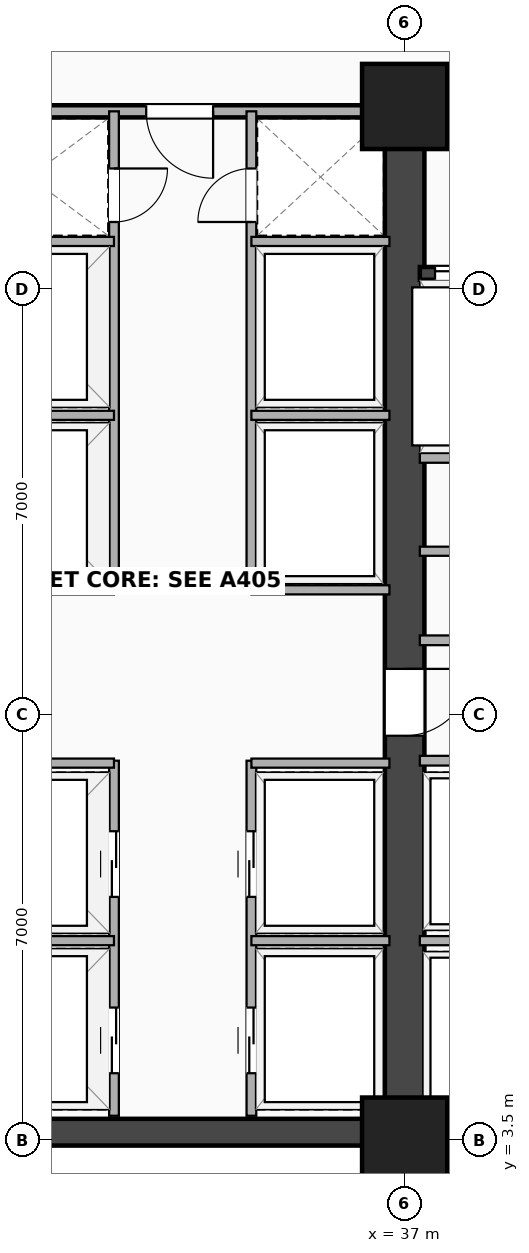
"""IFC4 building model, lengths in metres.
Left out: names, types, materials, properties, quantities, classifications, styles, units other than length and angle.
Written with IfcOpenShell. Run it as: python <this file> out.ifc"""

import sys

from ifc_helpers import new_model, si_unit, direction, frame, frame_2d, origin, origin_2d, place, context, subcontext, project, spatial, rectangle, extrude, element, fill, save


model = new_model("IFC4")
c1 = context("Model", 3, precision=1e-05, world=origin(), true_north=direction((0.0, 1.0)))
c2 = subcontext(c1, "Body", "Model", "MODEL_VIEW")
j1 = project(units=[si_unit("LENGTHUNIT", "METRE"), si_unit("PLANEANGLEUNIT", "RADIAN")], contexts=[c1])
p1 = place(None, origin())
s1 = spatial("IfcSite", under=j1, at=p1, CompositionType="ELEMENT")
p2 = place(p1, origin())
s2 = spatial("IfcBuilding", under=s1, at=p2, CompositionType="ELEMENT")
p3 = place(p2, frame((0.0, 0.0, 71.9)))
s3 = spatial("IfcBuildingStorey", under=s2, at=p3, CompositionType="ELEMENT", Elevation=71.9)
p4 = place(p3, frame((20.3, 3.63, 0.0), z_axis=(0.0, 0.0, 1.0), x_axis=(1.0, 0.0, 0.0)))
e1 = element("IfcWall", 1, at=p4, inside=s3, PredefinedType="SHEAR", context=c2, shape_type="SweptSolid", body=[
    extrude(rectangle(XDim=24.5, YDim=0.44, at=frame_2d((12.25, 0.0))), origin(), (0.0, 0.0, 1.0), 3.18),
])
p5 = place(p3, frame((37.0, 3.5, 0.0), z_axis=(0.0, 0.0, 1.0), x_axis=(0.0, 1.0, 0.0)))
e2 = element("IfcWall", 2, at=p5, inside=s3, PredefinedType="SHEAR", context=c2, shape_type="SweptSolid", body=[
    extrude(rectangle(XDim=16.9, YDim=0.65, at=frame_2d((8.45, 0.0))), origin(), (0.0, 0.0, 1.0), 3.18),
])
p6 = place(p5, frame((6.65, 0.0, 0.0)))
e3 = element("IfcOpeningElement", 3, at=p6, cuts=e2, PredefinedType="OPENING", context=c2, shape_type="SweptSolid", body=[
    extrude(rectangle(XDim=1.1, YDim=2.15, at=frame_2d((0.55, 1.075))), frame((0.0, 0.335, 0.0), z_axis=(0.0, -1.0, 0.0), x_axis=(1.0, 0.0, 0.0)), (0.0, 0.0, 1.0), 0.67),
])
p7 = place(p3, frame((37.25, 17.755, 0.0), z_axis=(0.0, 0.0, 1.0), x_axis=(1.0, 0.0, 0.0)))
e4 = element("IfcWall", 4, at=p7, inside=s3, PredefinedType="SHEAR", context=c2, shape_type="SweptSolid", body=[
    extrude(rectangle(XDim=7.2, YDim=0.21, at=frame_2d((3.6, 0.0))), origin(), (0.0, 0.0, 1.0), 3.18),
])
p8 = place(p7, frame((0.25, 0.0, 0.0)))
e5 = element("IfcOpeningElement", 5, at=p8, cuts=e4, PredefinedType="OPENING", context=c2, shape_type="SweptSolid", body=[
    extrude(rectangle(XDim=1.12, YDim=2.2, at=frame_2d((0.56, 1.1))), frame((0.0, 0.115, 0.0), z_axis=(0.0, -1.0, 0.0), x_axis=(1.0, 0.0, 0.0)), (0.0, 0.0, 1.0), 0.23),
])
p9 = place(p7, frame((2.05, 0.0, 0.0)))
e6 = element("IfcOpeningElement", 6, at=p9, cuts=e4, PredefinedType="OPENING", context=c2, shape_type="SweptSolid", body=[
    extrude(rectangle(XDim=1.1, YDim=2.18, at=frame_2d((0.55, 1.09))), frame((0.0, 0.115, 0.0), z_axis=(0.0, -1.0, 0.0), x_axis=(1.0, 0.0, 0.0)), (0.0, 0.0, 1.0), 0.23),
])
p10 = place(p7, frame((5.78, 0.0, 0.0), z_axis=(0.0, 0.0, 1.0), x_axis=(-1.0, 0.0, 0.0)))
e7 = element("IfcOpeningElement", 7, at=p10, cuts=e4, PredefinedType="OPENING", context=c2, shape_type="SweptSolid", body=[
    extrude(rectangle(XDim=1.05, YDim=2.15, at=frame_2d((0.525, 1.075))), frame((0.0, 0.115, 0.0), z_axis=(0.0, -1.0, 0.0), x_axis=(1.0, 0.0, 0.0)), (0.0, 0.0, 1.0), 0.23),
])
for number, where, z_axis, x_axis in (
    (8, (37.0, 3.5, -0.28), (0.0, 0.0, 1.0), (1.0, 0.0, 0.0)),
    (9, (37.0, 20.5, -0.28), (0.0, 0.0, 1.0), (1.0, 0.0, 0.0)),
):
    element("IfcColumn", number, at=place(p3, frame(where, z_axis=z_axis, x_axis=x_axis)), inside=s3, PredefinedType="COLUMN", context=c2, shape_type="SweptSolid", body=[
        extrude(rectangle(XDim=1.4, YDim=1.4, at=origin_2d()), origin(), (0.0, 0.0, 1.0), 3.46),
    ])
p11 = place(p3, frame((37.25, 14.72, 0.0), z_axis=(0.0, 0.0, 1.0), x_axis=(1.0, 0.0, 0.0)))
e10 = element("IfcWall", 10, at=p11, inside=s3, PredefinedType="PARTITIONING", context=c2, shape_type="SweptSolid", body=[
    extrude(rectangle(XDim=3.61, YDim=0.16, at=frame_2d((1.805, 0.0))), origin(), (0.0, 0.0, 1.0), 3.18),
])
p12 = place(p3, frame((29.2, 20.42, 0.0), z_axis=(0.0, 0.0, 1.0), x_axis=(1.0, 0.0, 0.0)))
e11 = element("IfcWall", 11, at=p12, inside=s3, PredefinedType="PARTITIONING", context=c2, shape_type="SweptSolid", body=[
    extrude(rectangle(XDim=7.8, YDim=0.2, at=frame_2d((3.9, 0.0))), origin(), (0.0, 0.0, 1.0), 2.47),
])
p13 = place(p12, frame((3.55, 0.0, 0.0)))
e12 = element("IfcOpeningElement", 12, at=p13, cuts=e11, PredefinedType="OPENING", context=c2, shape_type="SweptSolid", body=[
    extrude(rectangle(XDim=1.1, YDim=2.15, at=frame_2d((0.55, 1.075))), frame((0.0, 0.11, 0.0), z_axis=(0.0, -1.0, 0.0), x_axis=(1.0, 0.0, 0.0)), (0.0, 0.0, 1.0), 0.22),
])
p14 = place(p3, frame((37.0, 20.42, 0.0), z_axis=(0.0, 0.0, 1.0), x_axis=(1.0, 0.0, 0.0)))
e13 = element("IfcWall", 13, at=p14, inside=s3, PredefinedType="PARTITIONING", context=c2, shape_type="SweptSolid", body=[
    extrude(rectangle(XDim=7.45, YDim=0.2, at=frame_2d((3.725, 0.0))), origin(), (0.0, 0.0, 1.0), 2.47),
])
p15 = place(p14, frame((4.2, 0.0, 0.0)))
e14 = element("IfcOpeningElement", 14, at=p15, cuts=e13, PredefinedType="OPENING", context=c2, shape_type="SweptSolid", body=[
    extrude(rectangle(XDim=1.1, YDim=2.15, at=frame_2d((0.55, 1.075))), frame((0.0, 0.11, 0.0), z_axis=(0.0, -1.0, 0.0), x_axis=(1.0, 0.0, 0.0)), (0.0, 0.0, 1.0), 0.22),
])
p16 = place(p3, frame((37.25, 11.72, 0.0), z_axis=(0.0, 0.0, 1.0), x_axis=(1.0, 0.0, 0.0)))
e15 = element("IfcWall", 15, at=p16, inside=s3, PredefinedType="PARTITIONING", context=c2, shape_type="SweptSolid", body=[
    extrude(rectangle(XDim=3.61, YDim=0.16, at=frame_2d((1.805, 0.0))), origin(), (0.0, 0.0, 1.0), 3.18),
])
p17 = place(p16, frame((1.345, 0.0, 0.0)))
e16 = element("IfcOpeningElement", 16, at=p17, cuts=e15, PredefinedType="OPENING", context=c2, shape_type="SweptSolid", body=[
    extrude(rectangle(XDim=0.92, YDim=2.08, at=frame_2d((0.46, 1.04))), frame((0.0, 0.09, 0.0), z_axis=(0.0, -1.0, 0.0), x_axis=(1.0, 0.0, 0.0)), (0.0, 0.0, 1.0), 0.18),
])
p18 = place(p3, frame((37.25, 13.185, 0.0), z_axis=(0.0, 0.0, 1.0), x_axis=(1.0, 0.0, 0.0)))
e17 = element("IfcWall", 17, at=p18, inside=s3, PredefinedType="PARTITIONING", context=c2, shape_type="SweptSolid", body=[
    extrude(rectangle(XDim=3.61, YDim=0.15, at=frame_2d((1.805, 0.0))), origin(), (0.0, 0.0, 1.0), 3.18),
])
p19 = place(p18, frame((1.365, 0.0, 0.0)))
e18 = element("IfcOpeningElement", 18, at=p19, cuts=e17, PredefinedType="OPENING", context=c2, shape_type="SweptSolid", body=[
    extrude(rectangle(XDim=0.88, YDim=2.08, at=frame_2d((0.44, 1.04))), frame((0.0, 0.085, 0.0), z_axis=(0.0, -1.0, 0.0), x_axis=(1.0, 0.0, 0.0)), (0.0, 0.0, 1.0), 0.17),
])
p20 = place(p3, frame((37.25, 6.78, 0.0), z_axis=(0.0, 0.0, 1.0), x_axis=(1.0, 0.0, 0.0)))
e19 = element("IfcWall", 19, at=p20, inside=s3, PredefinedType="PARTITIONING", context=c2, shape_type="SweptSolid", body=[
    extrude(rectangle(XDim=2.17, YDim=0.15, at=frame_2d((1.085, 0.0))), origin(), (0.0, 0.0, 1.0), 3.18),
])
p21 = place(p3, frame((37.25, 9.74, 0.0), z_axis=(0.0, 0.0, 1.0), x_axis=(1.0, 0.0, 0.0)))
e20 = element("IfcWall", 20, at=p21, inside=s3, PredefinedType="PARTITIONING", context=c2, shape_type="SweptSolid", body=[
    extrude(rectangle(XDim=2.17, YDim=0.16, at=frame_2d((1.085, 0.0))), origin(), (0.0, 0.0, 1.0), 3.18),
])
p22 = place(p3, frame((32.22, 3.9, 0.0), z_axis=(0.0, 0.0, 1.0), x_axis=(0.0, 1.0, 0.0)))
e21 = element("IfcWall", 21, at=p22, inside=s3, PredefinedType="PARTITIONING", context=c2, shape_type="SweptSolid", body=[
    extrude(rectangle(XDim=5.84, YDim=0.16, at=frame_2d((2.92, 0.0))), origin(), (0.0, 0.0, 1.0), 3.18),
])
p23 = place(p22, frame((1.78, 0.0, 0.0), z_axis=(0.0, 0.0, 1.0), x_axis=(-1.0, 0.0, 0.0)))
e22 = element("IfcOpeningElement", 22, at=p23, cuts=e21, PredefinedType="OPENING", context=c2, shape_type="SweptSolid", body=[
    extrude(rectangle(XDim=1.08, YDim=2.16, at=frame_2d((0.54, 1.08))), frame((0.0, 0.09, 0.0), z_axis=(0.0, -1.0, 0.0), x_axis=(1.0, 0.0, 0.0)), (0.0, 0.0, 1.0), 0.18),
])
p24 = place(p22, frame((4.68, 0.0, 0.0), z_axis=(0.0, 0.0, 1.0), x_axis=(-1.0, 0.0, 0.0)))
e23 = element("IfcOpeningElement", 23, at=p24, cuts=e21, PredefinedType="OPENING", context=c2, shape_type="SweptSolid", body=[
    extrude(rectangle(XDim=1.08, YDim=2.16, at=frame_2d((0.54, 1.08))), frame((0.0, 0.09, 0.0), z_axis=(0.0, -1.0, 0.0), x_axis=(1.0, 0.0, 0.0)), (0.0, 0.0, 1.0), 0.18),
])
p25 = place(p3, frame((34.48, 3.9, 0.0), z_axis=(0.0, 0.0, 1.0), x_axis=(0.0, 1.0, 0.0)))
e24 = element("IfcWall", 24, at=p25, inside=s3, PredefinedType="PARTITIONING", context=c2, shape_type="SweptSolid", body=[
    extrude(rectangle(XDim=5.84, YDim=0.16, at=frame_2d((2.92, 0.0))), origin(), (0.0, 0.0, 1.0), 3.18),
])
p26 = place(p25, frame((0.7, 0.0, 0.0)))
e25 = element("IfcOpeningElement", 25, at=p26, cuts=e24, PredefinedType="OPENING", context=c2, shape_type="SweptSolid", body=[
    extrude(rectangle(XDim=1.08, YDim=2.16, at=frame_2d((0.54, 1.08))), frame((0.0, 0.09, 0.0), z_axis=(0.0, -1.0, 0.0), x_axis=(1.0, 0.0, 0.0)), (0.0, 0.0, 1.0), 0.18),
])
p27 = place(p25, frame((3.6, 0.0, 0.0)))
e26 = element("IfcOpeningElement", 26, at=p27, cuts=e24, PredefinedType="OPENING", context=c2, shape_type="SweptSolid", body=[
    extrude(rectangle(XDim=1.08, YDim=2.16, at=frame_2d((0.54, 1.08))), frame((0.0, 0.09, 0.0), z_axis=(0.0, -1.0, 0.0), x_axis=(1.0, 0.0, 0.0)), (0.0, 0.0, 1.0), 0.18),
])
p28 = place(p3, frame((29.45, 6.78, 0.0), z_axis=(0.0, 0.0, 1.0), x_axis=(1.0, 0.0, 0.0)))
e27 = element("IfcWall", 27, at=p28, inside=s3, PredefinedType="PARTITIONING", context=c2, shape_type="SweptSolid", body=[
    extrude(rectangle(XDim=2.77, YDim=0.15, at=frame_2d((1.385, 0.0))), origin(), (0.0, 0.0, 1.0), 3.18),
])
p29 = place(p3, frame((34.48, 6.78, 0.0), z_axis=(0.0, 0.0, 1.0), x_axis=(1.0, 0.0, 0.0)))
e28 = element("IfcWall", 28, at=p29, inside=s3, PredefinedType="PARTITIONING", context=c2, shape_type="SweptSolid", body=[
    extrude(rectangle(XDim=2.27, YDim=0.15, at=frame_2d((1.135, 0.0))), origin(), (0.0, 0.0, 1.0), 3.18),
])
p30 = place(p3, frame((29.45, 9.7, 0.0), z_axis=(0.0, 0.0, 1.0), x_axis=(1.0, 0.0, 0.0)))
e29 = element("IfcWall", 29, at=p30, inside=s3, PredefinedType="PARTITIONING", context=c2, shape_type="SweptSolid", body=[
    extrude(rectangle(XDim=2.77, YDim=0.15, at=frame_2d((1.385, 0.0))), origin(), (0.0, 0.0, 1.0), 3.18),
])
p31 = place(p3, frame((34.48, 9.7, 0.0), z_axis=(0.0, 0.0, 1.0), x_axis=(1.0, 0.0, 0.0)))
e30 = element("IfcWall", 30, at=p31, inside=s3, PredefinedType="PARTITIONING", context=c2, shape_type="SweptSolid", body=[
    extrude(rectangle(XDim=2.27, YDim=0.15, at=frame_2d((1.135, 0.0))), origin(), (0.0, 0.0, 1.0), 3.18),
])
p32 = place(p3, frame((32.22, 12.5, 0.0), z_axis=(0.0, 0.0, 1.0), x_axis=(0.0, 1.0, 0.0)))
e31 = element("IfcWall", 31, at=p32, inside=s3, PredefinedType="PARTITIONING", context=c2, shape_type="SweptSolid", body=[
    extrude(rectangle(XDim=7.92, YDim=0.16, at=frame_2d((3.96, 0.0))), origin(), (0.0, 0.0, 1.0), 2.47),
])
p33 = place(p32, frame((6.1, 0.0, 0.0)))
e32 = element("IfcOpeningElement", 32, at=p33, cuts=e31, PredefinedType="OPENING", context=c2, shape_type="SweptSolid", body=[
    extrude(rectangle(XDim=0.88, YDim=2.08, at=frame_2d((0.44, 1.04))), frame((0.0, 0.09, 0.0), z_axis=(0.0, -1.0, 0.0), x_axis=(1.0, 0.0, 0.0)), (0.0, 0.0, 1.0), 0.18),
])
p34 = place(p3, frame((34.48, 12.5, 0.0), z_axis=(0.0, 0.0, 1.0), x_axis=(0.0, 1.0, 0.0)))
e33 = element("IfcWall", 33, at=p34, inside=s3, PredefinedType="PARTITIONING", context=c2, shape_type="SweptSolid", body=[
    extrude(rectangle(XDim=7.92, YDim=0.16, at=frame_2d((3.96, 0.0))), origin(), (0.0, 0.0, 1.0), 2.47),
])
p35 = place(p34, frame((6.98, 0.0, 0.0), z_axis=(0.0, 0.0, 1.0), x_axis=(-1.0, 0.0, 0.0)))
e34 = element("IfcOpeningElement", 34, at=p35, cuts=e33, PredefinedType="OPENING", context=c2, shape_type="SweptSolid", body=[
    extrude(rectangle(XDim=0.88, YDim=2.08, at=frame_2d((0.44, 1.04))), frame((0.0, 0.09, 0.0), z_axis=(0.0, -1.0, 0.0), x_axis=(1.0, 0.0, 0.0)), (0.0, 0.0, 1.0), 0.18),
])
p36 = place(p3, frame((29.45, 12.55, 0.0), z_axis=(0.0, 0.0, 1.0), x_axis=(1.0, 0.0, 0.0)))
e35 = element("IfcWall", 35, at=p36, inside=s3, PredefinedType="PARTITIONING", context=c2, shape_type="SweptSolid", body=[
    extrude(rectangle(XDim=2.77, YDim=0.15, at=frame_2d((1.385, 0.0))), origin(), (0.0, 0.0, 1.0), 3.18),
])
p37 = place(p3, frame((34.48, 12.55, 0.0), z_axis=(0.0, 0.0, 1.0), x_axis=(1.0, 0.0, 0.0)))
e36 = element("IfcWall", 36, at=p37, inside=s3, PredefinedType="PARTITIONING", context=c2, shape_type="SweptSolid", body=[
    extrude(rectangle(XDim=2.27, YDim=0.15, at=frame_2d((1.135, 0.0))), origin(), (0.0, 0.0, 1.0), 3.18),
])
p38 = place(p3, frame((29.45, 15.42, 0.0), z_axis=(0.0, 0.0, 1.0), x_axis=(1.0, 0.0, 0.0)))
e37 = element("IfcWall", 37, at=p38, inside=s3, PredefinedType="PARTITIONING", context=c2, shape_type="SweptSolid", body=[
    extrude(rectangle(XDim=2.77, YDim=0.15, at=frame_2d((1.385, 0.0))), origin(), (0.0, 0.0, 1.0), 3.18),
])
p39 = place(p3, frame((34.48, 15.42, 0.0), z_axis=(0.0, 0.0, 1.0), x_axis=(1.0, 0.0, 0.0)))
e38 = element("IfcWall", 38, at=p39, inside=s3, PredefinedType="PARTITIONING", context=c2, shape_type="SweptSolid", body=[
    extrude(rectangle(XDim=2.27, YDim=0.15, at=frame_2d((1.135, 0.0))), origin(), (0.0, 0.0, 1.0), 3.18),
])
p40 = place(p3, frame((29.45, 18.28, 0.0), z_axis=(0.0, 0.0, 1.0), x_axis=(1.0, 0.0, 0.0)))
e39 = element("IfcWall", 39, at=p40, inside=s3, PredefinedType="PARTITIONING", context=c2, shape_type="SweptSolid", body=[
    extrude(rectangle(XDim=2.77, YDim=0.15, at=frame_2d((1.385, 0.0))), origin(), (0.0, 0.0, 1.0), 3.18),
])
p41 = place(p3, frame((34.48, 18.28, 0.0), z_axis=(0.0, 0.0, 1.0), x_axis=(1.0, 0.0, 0.0)))
e40 = element("IfcWall", 40, at=p41, inside=s3, PredefinedType="PARTITIONING", context=c2, shape_type="SweptSolid", body=[
    extrude(rectangle(XDim=2.27, YDim=0.15, at=frame_2d((1.135, 0.0))), origin(), (0.0, 0.0, 1.0), 3.18),
])
p42 = place(p8, origin())
e41 = element("IfcDoor", 41, at=p42, inside=s3, OperationType="DOUBLE_DOOR_SLIDING", PredefinedType="DOOR", context=c2, shape_type="SweptSolid", body=[
    extrude(rectangle(XDim=1.12, YDim=2.2, at=frame_2d((0.56, 1.1))), frame((0.0, 0.025, 0.0), z_axis=(0.0, -1.0, 0.0), x_axis=(1.0, 0.0, 0.0)), (0.0, 0.0, 1.0), 0.05),
])
fill(e5, e41)
p43 = place(p6, origin())
e42 = element("IfcDoor", 42, at=p43, inside=s3, OperationType="SINGLE_SWING_RIGHT", PredefinedType="DOOR", context=c2, shape_type="SweptSolid", body=[
    extrude(rectangle(XDim=1.1, YDim=2.15, at=frame_2d((0.55, 1.075))), frame((0.0, 0.025, 0.0), z_axis=(0.0, -1.0, 0.0), x_axis=(1.0, 0.0, 0.0)), (0.0, 0.0, 1.0), 0.05),
])
fill(e3, e42)
p44 = place(p13, origin())
e43 = element("IfcDoor", 43, at=p44, inside=s3, OperationType="SINGLE_SWING_RIGHT", PredefinedType="DOOR", context=c2, shape_type="SweptSolid", body=[
    extrude(rectangle(XDim=1.1, YDim=2.15, at=frame_2d((0.55, 1.075))), frame((0.0, 0.025, 0.0), z_axis=(0.0, -1.0, 0.0), x_axis=(1.0, 0.0, 0.0)), (0.0, 0.0, 1.0), 0.05),
])
fill(e12, e43)
p45 = place(p23, origin())
e44 = element("IfcDoor", 44, at=p45, inside=s3, OperationType="DOUBLE_DOOR_SLIDING", PredefinedType="DOOR", context=c2, shape_type="SweptSolid", body=[
    extrude(rectangle(XDim=1.08, YDim=2.16, at=frame_2d((0.54, 1.08))), frame((0.0, 0.025, 0.0), z_axis=(0.0, -1.0, 0.0), x_axis=(1.0, 0.0, 0.0)), (0.0, 0.0, 1.0), 0.05),
])
fill(e22, e44)
p46 = place(p24, origin())
e45 = element("IfcDoor", 45, at=p46, inside=s3, OperationType="DOUBLE_DOOR_SLIDING", PredefinedType="DOOR", context=c2, shape_type="SweptSolid", body=[
    extrude(rectangle(XDim=1.08, YDim=2.16, at=frame_2d((0.54, 1.08))), frame((0.0, 0.025, 0.0), z_axis=(0.0, -1.0, 0.0), x_axis=(1.0, 0.0, 0.0)), (0.0, 0.0, 1.0), 0.05),
])
fill(e23, e45)
p47 = place(p26, origin())
e46 = element("IfcDoor", 46, at=p47, inside=s3, OperationType="DOUBLE_DOOR_SLIDING", PredefinedType="DOOR", context=c2, shape_type="SweptSolid", body=[
    extrude(rectangle(XDim=1.08, YDim=2.16, at=frame_2d((0.54, 1.08))), frame((0.0, 0.025, 0.0), z_axis=(0.0, -1.0, 0.0), x_axis=(1.0, 0.0, 0.0)), (0.0, 0.0, 1.0), 0.05),
])
fill(e25, e46)
p48 = place(p27, origin())
e47 = element("IfcDoor", 47, at=p48, inside=s3, OperationType="DOUBLE_DOOR_SLIDING", PredefinedType="DOOR", context=c2, shape_type="SweptSolid", body=[
    extrude(rectangle(XDim=1.08, YDim=2.16, at=frame_2d((0.54, 1.08))), frame((0.0, 0.025, 0.0), z_axis=(0.0, -1.0, 0.0), x_axis=(1.0, 0.0, 0.0)), (0.0, 0.0, 1.0), 0.05),
])
fill(e26, e47)
p49 = place(p33, origin())
e48 = element("IfcDoor", 48, at=p49, inside=s3, OperationType="SINGLE_SWING_RIGHT", PredefinedType="DOOR", context=c2, shape_type="SweptSolid", body=[
    extrude(rectangle(XDim=0.88, YDim=2.08, at=frame_2d((0.44, 1.04))), frame((0.0, 0.025, 0.0), z_axis=(0.0, -1.0, 0.0), x_axis=(1.0, 0.0, 0.0)), (0.0, 0.0, 1.0), 0.05),
])
fill(e32, e48)
p50 = place(p35, origin())
e49 = element("IfcDoor", 49, at=p50, inside=s3, OperationType="SINGLE_SWING_LEFT", PredefinedType="DOOR", context=c2, shape_type="SweptSolid", body=[
    extrude(rectangle(XDim=0.88, YDim=2.08, at=frame_2d((0.44, 1.04))), frame((0.0, 0.025, 0.0), z_axis=(0.0, -1.0, 0.0), x_axis=(1.0, 0.0, 0.0)), (0.0, 0.0, 1.0), 0.05),
])
fill(e34, e49)
save(model, sys.argv[1])
